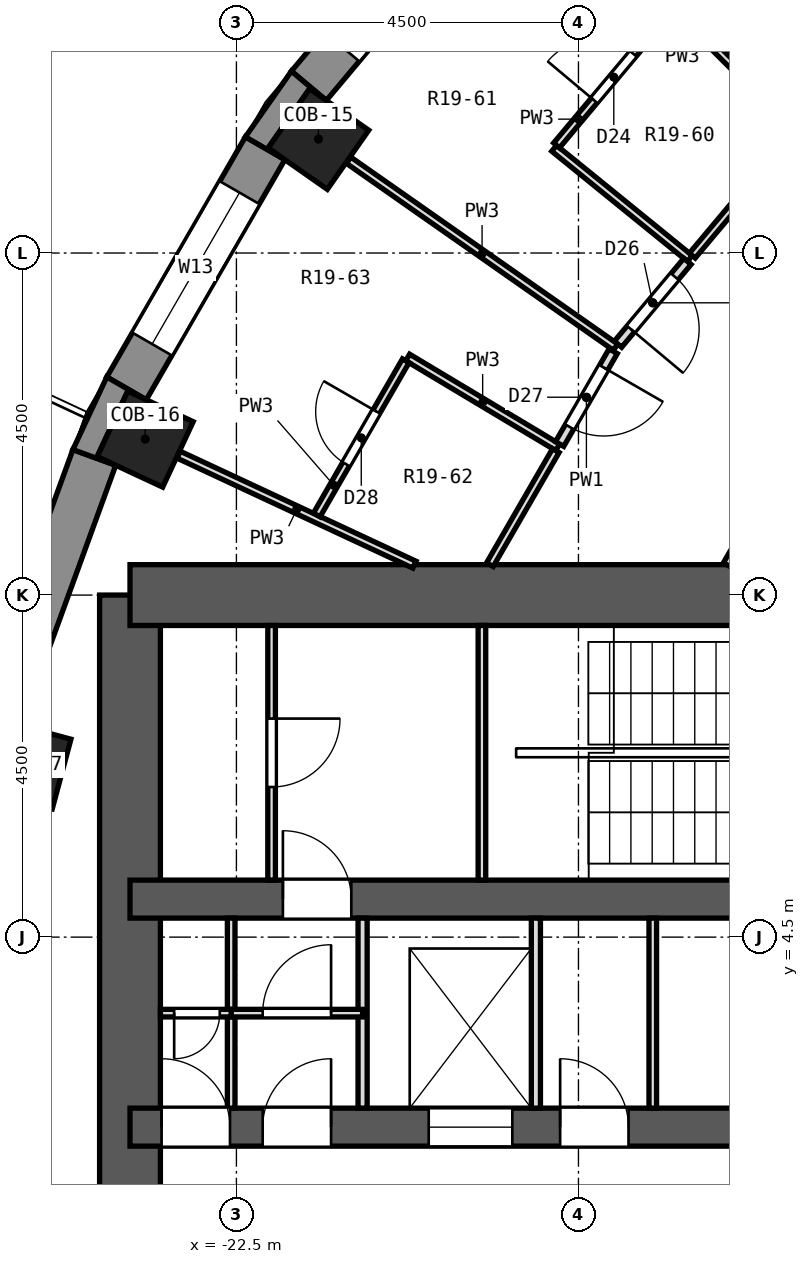
"""IFC4 building model, lengths in metres.
Left out: names, types, materials, properties, quantities, classifications, styles, units other than length and angle.
Written with IfcOpenShell. Run it as: python <this file> out.ifc"""

import sys

from ifc_helpers import new_model, si_unit, direction, frame, frame_2d, origin, origin_2d, place, context, subcontext, project, spatial, polyline, rectangle, outline, extrude, element, fill, save


model = new_model("IFC4")
c1 = context("Model", 3, precision=1e-05, world=origin(), true_north=direction((0.0, 1.0)))
c2 = subcontext(c1, "Body", "Model", "MODEL_VIEW")
j1 = project(units=[si_unit("LENGTHUNIT", "METRE"), si_unit("PLANEANGLEUNIT", "RADIAN")], contexts=[c1])
p1 = place(None, origin())
s1 = spatial("IfcSite", under=j1, at=p1, CompositionType="ELEMENT")
p2 = place(p1, origin())
s2 = spatial("IfcBuilding", under=s1, at=p2, CompositionType="ELEMENT")
p3 = place(p2, frame((0.0, 0.0, 111.7)))
s3 = spatial("IfcBuildingStorey", under=s2, at=p3, CompositionType="ELEMENT", Elevation=111.7)
for number, where, z_axis, x_axis in (
    (1, (-21.421, 14.999, 0.0), (0.0, 0.0, 1.0), (-0.819, 0.574, 0.0)),
    (2, (-23.7, 11.052, 0.0), (0.0, 0.0, 1.0), (-0.906, 0.423, 0.0)),
    (3, (-25.259, 6.768, 0.0), (0.0, 0.0, 1.0), (-0.966, 0.259, 0.0)),
):
    element("IfcColumn", number, at=place(p3, frame(where, z_axis=z_axis, x_axis=x_axis)), inside=s3, PredefinedType="COLUMN", context=c2, shape_type="SweptSolid", body=[
        extrude(rectangle(XDim=0.95, YDim=0.95, at=origin_2d()), origin(), (0.0, 0.0, 1.0), 3.3),
    ])
p4 = place(p3, frame((-23.9, -9.0, 0.0), z_axis=(0.0, 0.0, 1.0), x_axis=(0.0, 1.0, 0.0)))
e4 = element("IfcWall", 4, at=p4, inside=s3, PredefinedType="SHEAR", context=c2, shape_type="SweptSolid", body=[
    extrude(rectangle(XDim=18.0, YDim=0.8, at=frame_2d((9.0, 0.0))), origin(), (0.0, 0.0, 1.0), 3.3),
])
p5 = place(p3, frame((-13.5, 9.0, 0.0), z_axis=(0.0, 0.0, 1.0), x_axis=(-1.0, 0.0, 0.0)))
e5 = element("IfcWall", 5, at=p5, inside=s3, PredefinedType="SHEAR", context=c2, shape_type="SweptSolid", body=[
    extrude(rectangle(XDim=10.4, YDim=0.8, at=frame_2d((5.2, 0.0))), origin(), (0.0, 0.0, 1.0), 3.3),
])
p6 = place(p3, frame((-13.5, 5.0, 0.0), z_axis=(0.0, 0.0, 1.0), x_axis=(-1.0, 0.0, 0.0)))
e6 = element("IfcWall", 6, at=p6, inside=s3, PredefinedType="SHEAR", context=c2, shape_type="SweptSolid", body=[
    extrude(rectangle(XDim=10.4, YDim=0.5, at=frame_2d((5.2, 0.0))), origin(), (0.0, 0.0, 1.0), 3.3),
])
p7 = place(p6, frame((7.489, 0.0, 0.0)))
e7 = element("IfcOpeningElement", 7, at=p7, cuts=e6, PredefinedType="OPENING", context=c2, shape_type="SweptSolid", body=[
    extrude(rectangle(XDim=0.9, YDim=2.1, at=frame_2d((0.45, 1.05))), frame((0.0, 0.262, 0.0), z_axis=(0.0, -1.0, 0.0), x_axis=(1.0, 0.0, 0.0)), (0.0, 0.0, 1.0), 0.524),
])
p8 = place(p3, frame((-13.5, 2.0, 0.0), z_axis=(0.0, 0.0, 1.0), x_axis=(-1.0, 0.0, 0.0)))
e8 = element("IfcWall", 8, at=p8, inside=s3, PredefinedType="SHEAR", context=c2, shape_type="SweptSolid", body=[
    extrude(rectangle(XDim=10.4, YDim=0.5, at=frame_2d((5.2, 0.0))), origin(), (0.0, 0.0, 1.0), 3.3),
])
p9 = place(p8, frame((5.37, 0.0, 0.0)))
e9 = element("IfcOpeningElement", 9, at=p9, cuts=e8, PredefinedType="OPENING", context=c2, shape_type="SweptSolid", body=[
    extrude(rectangle(XDim=1.1, YDim=2.1, at=frame_2d((0.55, 1.05))), frame((0.0, 0.262, 0.0), z_axis=(0.0, -1.0, 0.0), x_axis=(1.0, 0.0, 0.0)), (0.0, 0.0, 1.0), 0.524),
])
p10 = place(p8, frame((1.511, 0.0, 0.0)))
e10 = element("IfcOpeningElement", 10, at=p10, cuts=e8, PredefinedType="OPENING", context=c2, shape_type="SweptSolid", body=[
    extrude(rectangle(XDim=0.9, YDim=2.1, at=frame_2d((0.45, 1.05))), frame((0.0, 0.262, 0.0), z_axis=(0.0, -1.0, 0.0), x_axis=(1.0, 0.0, 0.0)), (0.0, 0.0, 1.0), 0.524),
])
p11 = place(p8, frame((3.841, 0.0, 0.0)))
e11 = element("IfcOpeningElement", 11, at=p11, cuts=e8, PredefinedType="OPENING", context=c2, shape_type="SweptSolid", body=[
    extrude(rectangle(XDim=0.9, YDim=2.1, at=frame_2d((0.45, 1.05))), frame((0.0, 0.262, 0.0), z_axis=(0.0, -1.0, 0.0), x_axis=(1.0, 0.0, 0.0)), (0.0, 0.0, 1.0), 0.524),
])
p12 = place(p8, frame((7.754, 0.0, 0.0)))
e12 = element("IfcOpeningElement", 12, at=p12, cuts=e8, PredefinedType="OPENING", context=c2, shape_type="SweptSolid", body=[
    extrude(rectangle(XDim=0.9, YDim=2.1, at=frame_2d((0.45, 1.05))), frame((0.0, 0.262, 0.0), z_axis=(0.0, -1.0, 0.0), x_axis=(1.0, 0.0, 0.0)), (0.0, 0.0, 1.0), 0.524),
])
p13 = place(p8, frame((9.084, 0.0, 0.0)))
e13 = element("IfcOpeningElement", 13, at=p13, cuts=e8, PredefinedType="OPENING", context=c2, shape_type="SweptSolid", body=[
    extrude(rectangle(XDim=0.9, YDim=2.1, at=frame_2d((0.45, 1.05))), frame((0.0, 0.262, 0.0), z_axis=(0.0, -1.0, 0.0), x_axis=(1.0, 0.0, 0.0)), (0.0, 0.0, 1.0), 0.524),
])
p14 = place(p3, frame((-19.202, 18.494, 0.0), z_axis=(0.0, 0.0, 1.0), x_axis=(-0.642774476932, -0.766055462616, 0.0)))
e14 = element("IfcWall", 14, at=p14, inside=s3, PredefinedType="SOLIDWALL", context=c2, shape_type="SweptSolid", body=[
    extrude(rectangle(XDim=3.648, YDim=0.6, at=frame_2d((1.824, 0.0))), origin(), (0.0, 0.0, 1.0), 2.8),
])
p15 = place(p14, frame((0.674, 0.0, 0.9)))
e15 = element("IfcOpeningElement", 15, at=p15, cuts=e14, PredefinedType="OPENING", context=c2, shape_type="SweptSolid", body=[
    extrude(rectangle(XDim=2.3, YDim=1.8, at=frame_2d((1.15, 0.9))), frame((0.0, 0.312, 0.0), z_axis=(0.0, -1.0, 0.0), x_axis=(1.0, 0.0, 0.0)), (0.0, 0.0, 1.0), 0.624),
])
p16 = place(p3, frame((-22.122, 14.878, 0.0), z_axis=(0.0, 0.0, 1.0), x_axis=(-0.499954196102, -0.866051847062, 0.0)))
e16 = element("IfcWall", 16, at=p16, inside=s3, PredefinedType="SOLIDWALL", context=c2, shape_type="SweptSolid", body=[
    extrude(rectangle(XDim=3.648, YDim=0.6, at=frame_2d((1.824, 0.0))), origin(), (0.0, 0.0, 1.0), 2.8),
])
p17 = place(p16, frame((0.674, 0.0, 0.9)))
e17 = element("IfcOpeningElement", 17, at=p17, cuts=e16, PredefinedType="OPENING", context=c2, shape_type="SweptSolid", body=[
    extrude(rectangle(XDim=2.3, YDim=1.8, at=frame_2d((1.15, 0.9))), frame((0.0, 0.312, 0.0), z_axis=(0.0, -1.0, 0.0), x_axis=(1.0, 0.0, 0.0)), (0.0, 0.0, 1.0), 0.624),
])
p18 = place(p3, frame((-24.369, 10.811, 0.0), z_axis=(0.0, 0.0, 1.0), x_axis=(-0.341990236633, -0.939703505393, 0.0)))
e18 = element("IfcWall", 18, at=p18, inside=s3, PredefinedType="SOLIDWALL", context=c2, shape_type="SweptSolid", body=[
    extrude(rectangle(XDim=3.648, YDim=0.6, at=frame_2d((1.824, 0.0))), origin(), (0.0, 0.0, 1.0), 2.8),
])
p19 = place(p3, origin())
e19 = element("IfcWall", 19, at=p19, inside=s3, PredefinedType="SOLIDWALL", context=c2, shape_type="SweptSolid", body=[
    extrude(outline(polyline([(-22.382, 15.028), (-21.862, 14.728), (-22.083, 14.882), (-21.538, 15.661), (-21.317, 15.506), (-21.777, 15.892), (-22.382, 15.028)])), origin(), (0.0, 0.0, 1.0), 2.8),
])
p20 = place(p3, origin())
e20 = element("IfcWall", 20, at=p20, inside=s3, PredefinedType="SOLIDWALL", context=c2, shape_type="SweptSolid", body=[
    extrude(outline(polyline([(-24.651, 10.913), (-24.087, 10.708), (-24.331, 10.822), (-23.93, 11.683), (-23.686, 11.569), (-24.206, 11.869), (-24.651, 10.913)])), origin(), (0.0, 0.0, 1.0), 2.8),
])
p21 = place(p3, frame((-18.148, 18.148, 0.0), z_axis=(0.0, 0.0, 1.0), x_axis=(0.707106781187, -0.707106781187, 0.0)))
e21 = element("IfcWall", 21, at=p21, inside=s3, PredefinedType="PARTITIONING", context=c2, shape_type="SweptSolid", body=[
    extrude(rectangle(XDim=4.286, YDim=0.1, at=frame_2d((2.143, 0.0))), origin(), (0.0, 0.0, 1.0), 2.8),
])
p22 = place(p3, frame((-18.32, 14.878, 0.0), z_axis=(0.0, 0.0, 1.0), x_axis=(0.776386597989, -0.630256971768, 0.0)))
e22 = element("IfcWall", 22, at=p22, inside=s3, PredefinedType="PARTITIONING", context=c2, shape_type="SweptSolid", body=[
    extrude(rectangle(XDim=2.301, YDim=0.1, at=frame_2d((1.15, 0.0))), origin(), (0.0, 0.0, 1.0), 2.8),
])
p23 = place(p3, frame((-21.024, 14.721, 0.0), z_axis=(0.0, 0.0, 1.0), x_axis=(0.819173054824, -0.573546429028, 0.0)))
e23 = element("IfcWall", 23, at=p23, inside=s3, PredefinedType="PARTITIONING", context=c2, shape_type="SweptSolid", body=[
    extrude(rectangle(XDim=4.287, YDim=0.1, at=frame_2d((2.144, 0.0))), origin(), (0.0, 0.0, 1.0), 2.8),
])
p24 = place(p3, frame((-20.247, 12.126, 0.0), z_axis=(0.0, 0.0, 1.0), x_axis=(0.857988737522, -0.513668498435, 0.0)))
e24 = element("IfcWall", 24, at=p24, inside=s3, PredefinedType="PARTITIONING", context=c2, shape_type="SweptSolid", body=[
    extrude(rectangle(XDim=2.301, YDim=0.1, at=frame_2d((1.15, 0.0))), origin(), (0.0, 0.0, 1.0), 2.8),
])
p25 = place(p3, frame((-23.26, 10.847, 0.0), z_axis=(0.0, 0.0, 1.0), x_axis=(0.906263293643, -0.422713665021, 0.0)))
e25 = element("IfcWall", 25, at=p25, inside=s3, PredefinedType="PARTITIONING", context=c2, shape_type="SweptSolid", body=[
    extrude(rectangle(XDim=3.423, YDim=0.1, at=frame_2d((1.711, 0.0))), origin(), (0.0, 0.0, 1.0), 2.8),
])
p26 = place(p3, frame((-16.502, 13.466, 0.0), z_axis=(0.0, 0.0, 1.0), x_axis=(0.642783688793, 0.766047733122, 0.0)))
e26 = element("IfcWall", 26, at=p26, inside=s3, PredefinedType="PARTITIONING", context=c2, shape_type="SweptSolid", body=[
    extrude(rectangle(XDim=2.104, YDim=0.1, at=frame_2d((1.052, 0.0))), origin(), (0.0, 0.0, 1.0), 2.8),
])
p27 = place(p3, frame((-17.48, 12.3, 0.0), z_axis=(0.0, 0.0, 1.0), x_axis=(0.642680541645, 0.766134271124, 0.0)))
e27 = element("IfcWall", 27, at=p27, inside=s3, PredefinedType="PARTITIONING", context=c2, shape_type="SweptSolid", body=[
    extrude(rectangle(XDim=1.422, YDim=0.125, at=frame_2d((0.711, 0.0))), origin(), (0.0, 0.0, 1.0), 2.8),
])
p28 = place(p27, frame((0.261, 0.0, 0.0)))
e28 = element("IfcOpeningElement", 28, at=p28, cuts=e27, PredefinedType="OPENING", context=c2, shape_type="SweptSolid", body=[
    extrude(rectangle(XDim=0.9, YDim=2.1, at=frame_2d((0.45, 1.05))), frame((0.0, 0.074, 0.0), z_axis=(0.0, -1.0, 0.0), x_axis=(1.0, 0.0, 0.0)), (0.0, 0.0, 1.0), 0.149),
])
p29 = place(p3, frame((-18.288, 14.916, 0.0), z_axis=(0.0, 0.0, 1.0), x_axis=(0.642558986359, 0.766236222747, 0.0)))
e29 = element("IfcWall", 29, at=p29, inside=s3, PredefinedType="PARTITIONING", context=c2, shape_type="SweptSolid", body=[
    extrude(rectangle(XDim=2.343, YDim=0.1, at=frame_2d((1.172, 0.0))), origin(), (0.0, 0.0, 1.0), 2.8),
])
p30 = place(p29, frame((0.771, 0.0, 0.0)))
e30 = element("IfcOpeningElement", 30, at=p30, cuts=e29, PredefinedType="OPENING", context=c2, shape_type="SweptSolid", body=[
    extrude(rectangle(XDim=0.8, YDim=2.1, at=frame_2d((0.4, 1.05))), frame((0.0, 0.062, 0.0), z_axis=(0.0, -1.0, 0.0), x_axis=(1.0, 0.0, 0.0)), (0.0, 0.0, 1.0), 0.124),
])
p31 = place(p3, frame((-16.049, 9.4, 0.0), z_axis=(0.0, 0.0, 1.0), x_axis=(0.499553700297, 0.866282921752, 0.0)))
e31 = element("IfcWall", 31, at=p31, inside=s3, PredefinedType="PARTITIONING", context=c2, shape_type="SweptSolid", body=[
    extrude(rectangle(XDim=1.461, YDim=0.1, at=frame_2d((0.73, 0.0))), origin(), (0.0, 0.0, 1.0), 2.8),
])
p32 = place(p3, frame((-19.165, 9.4, 0.0), z_axis=(0.0, 0.0, 1.0), x_axis=(0.500214230422, 0.865901682458, 0.0)))
e32 = element("IfcWall", 32, at=p32, inside=s3, PredefinedType="PARTITIONING", context=c2, shape_type="SweptSolid", body=[
    extrude(rectangle(XDim=1.733, YDim=0.1, at=frame_2d((0.867, 0.0))), origin(), (0.0, 0.0, 1.0), 2.8),
])
p33 = place(p3, frame((-18.248, 10.987, 0.0), z_axis=(0.0, 0.0, 1.0), x_axis=(0.500107311056, 0.865963438852, 0.0)))
e33 = element("IfcWall", 33, at=p33, inside=s3, PredefinedType="PARTITIONING", context=c2, shape_type="SweptSolid", body=[
    extrude(rectangle(XDim=1.409, YDim=0.125, at=frame_2d((0.705, 0.0))), origin(), (0.0, 0.0, 1.0), 2.8),
])
p34 = place(p33, frame((0.261, 0.0, 0.0)))
e34 = element("IfcOpeningElement", 34, at=p34, cuts=e33, PredefinedType="OPENING", context=c2, shape_type="SweptSolid", body=[
    extrude(rectangle(XDim=0.9, YDim=2.1, at=frame_2d((0.45, 1.05))), frame((0.0, 0.074, 0.0), z_axis=(0.0, -1.0, 0.0), x_axis=(1.0, 0.0, 0.0)), (0.0, 0.0, 1.0), 0.149),
])
p35 = place(p3, frame((-21.443, 10.054, 0.0), z_axis=(0.0, 0.0, 1.0), x_axis=(0.499984100898, 0.86603458294, 0.0)))
e35 = element("IfcWall", 35, at=p35, inside=s3, PredefinedType="PARTITIONING", context=c2, shape_type="SweptSolid", body=[
    extrude(rectangle(XDim=2.342, YDim=0.1, at=frame_2d((1.171, 0.0))), origin(), (0.0, 0.0, 1.0), 2.8),
])
p36 = place(p35, frame((0.771, 0.0, 0.0)))
e36 = element("IfcOpeningElement", 36, at=p36, cuts=e35, PredefinedType="OPENING", context=c2, shape_type="SweptSolid", body=[
    extrude(rectangle(XDim=0.8, YDim=2.1, at=frame_2d((0.4, 1.05))), frame((0.0, 0.062, 0.0), z_axis=(0.0, -1.0, 0.0), x_axis=(1.0, 0.0, 0.0)), (0.0, 0.0, 1.0), 0.124),
])
p37 = place(p3, frame((-17.022, 2.25, 0.0), z_axis=(0.0, 0.0, 1.0), x_axis=(0.0, 1.0, 0.0)))
e37 = element("IfcWall", 37, at=p37, inside=s3, PredefinedType="PARTITIONING", context=c2, shape_type="SweptSolid", body=[
    extrude(rectangle(XDim=2.5, YDim=0.1, at=frame_2d((1.25, 0.0))), origin(), (0.0, 0.0, 1.0), 2.8),
])
for number, where, z_axis, x_axis in (
    (38, (-18.56, 2.25, 0.0), (0.0, 0.0, 1.0), (0.0, 1.0, 0.0)),
    (39, (-20.84, 2.25, 0.0), (0.0, 0.0, 1.0), (0.0, 1.0, 0.0)),
):
    element("IfcWall", number, at=place(p3, frame(where, z_axis=z_axis, x_axis=x_axis)), inside=s3, PredefinedType="PARTITIONING", context=c2, shape_type="SweptSolid", body=[
        extrude(rectangle(XDim=2.5, YDim=0.12, at=frame_2d((1.25, 0.0))), origin(), (0.0, 0.0, 1.0), 2.8),
    ])
p38 = place(p3, frame((-22.569, 2.25, 0.0), z_axis=(0.0, 0.0, 1.0), x_axis=(0.0, 1.0, 0.0)))
e40 = element("IfcWall", 40, at=p38, inside=s3, PredefinedType="PARTITIONING", context=c2, shape_type="SweptSolid", body=[
    extrude(rectangle(XDim=2.5, YDim=0.1, at=frame_2d((1.25, 0.0))), origin(), (0.0, 0.0, 1.0), 2.8),
])
p39 = place(p3, frame((-20.84, 3.5, 0.0), z_axis=(0.0, 0.0, 1.0), x_axis=(-1.0, 0.0, 0.0)))
e41 = element("IfcWall", 41, at=p39, inside=s3, PredefinedType="PARTITIONING", context=c2, shape_type="SweptSolid", body=[
    extrude(rectangle(XDim=1.729, YDim=0.1, at=frame_2d((0.865, 0.0))), origin(), (0.0, 0.0, 1.0), 2.8),
])
p40 = place(p39, frame((0.415, 0.0, 0.0)))
e42 = element("IfcOpeningElement", 42, at=p40, cuts=e41, PredefinedType="OPENING", context=c2, shape_type="SweptSolid", body=[
    extrude(rectangle(XDim=0.9, YDim=2.1, at=frame_2d((0.45, 1.05))), frame((0.0, 0.062, 0.0), z_axis=(0.0, -1.0, 0.0), x_axis=(1.0, 0.0, 0.0)), (0.0, 0.0, 1.0), 0.124),
])
p41 = place(p3, frame((-22.569, 3.5, 0.0), z_axis=(0.0, 0.0, 1.0), x_axis=(-1.0, 0.0, 0.0)))
e43 = element("IfcWall", 43, at=p41, inside=s3, PredefinedType="PARTITIONING", context=c2, shape_type="SweptSolid", body=[
    extrude(rectangle(XDim=0.931, YDim=0.1, at=frame_2d((0.465, 0.0))), origin(), (0.0, 0.0, 1.0), 2.8),
])
p42 = place(p41, frame((0.15, 0.0, 0.0)))
e44 = element("IfcOpeningElement", 44, at=p42, cuts=e43, PredefinedType="OPENING", context=c2, shape_type="SweptSolid", body=[
    extrude(rectangle(XDim=0.6, YDim=2.1, at=frame_2d((0.3, 1.05))), frame((0.0, 0.062, 0.0), z_axis=(0.0, -1.0, 0.0), x_axis=(1.0, 0.0, 0.0)), (0.0, 0.0, 1.0), 0.124),
])
p43 = place(p3, frame((-19.27, 5.25, 0.0), z_axis=(0.0, 0.0, 1.0), x_axis=(0.0, 1.0, 0.0)))
e45 = element("IfcWall", 45, at=p43, inside=s3, PredefinedType="PARTITIONING", context=c2, shape_type="SweptSolid", body=[
    extrude(rectangle(XDim=3.35, YDim=0.1, at=frame_2d((1.675, 0.0))), origin(), (0.0, 0.0, 1.0), 2.8),
])
p44 = place(p3, frame((-22.037, 5.25, 0.0), z_axis=(0.0, 0.0, 1.0), x_axis=(0.0, 1.0, 0.0)))
e46 = element("IfcWall", 46, at=p44, inside=s3, PredefinedType="PARTITIONING", context=c2, shape_type="SweptSolid", body=[
    extrude(rectangle(XDim=3.35, YDim=0.1, at=frame_2d((1.675, 0.0))), origin(), (0.0, 0.0, 1.0), 2.8),
])
p45 = place(p44, frame((1.225, 0.0, 0.0)))
e47 = element("IfcOpeningElement", 47, at=p45, cuts=e46, PredefinedType="OPENING", context=c2, shape_type="SweptSolid", body=[
    extrude(rectangle(XDim=0.9, YDim=2.1, at=frame_2d((0.45, 1.05))), frame((0.0, 0.062, 0.0), z_axis=(0.0, -1.0, 0.0), x_axis=(1.0, 0.0, 0.0)), (0.0, 0.0, 1.0), 0.124),
])
p46 = place(p15, origin())
e48 = element("IfcWindow", 48, at=p46, inside=s3, PartitioningType="SINGLE_PANEL", PredefinedType="WINDOW", context=c2, shape_type="SweptSolid", body=[
    extrude(rectangle(XDim=2.3, YDim=1.8, at=frame_2d((1.15, 0.9))), frame((0.0, 0.18, 0.0), z_axis=(0.0, -1.0, 0.0), x_axis=(1.0, 0.0, 0.0)), (0.0, 0.0, 1.0), 0.06),
])
fill(e15, e48)
p47 = place(p17, origin())
e49 = element("IfcWindow", 49, at=p47, inside=s3, PartitioningType="SINGLE_PANEL", PredefinedType="WINDOW", context=c2, shape_type="SweptSolid", body=[
    extrude(rectangle(XDim=2.3, YDim=1.8, at=frame_2d((1.15, 0.9))), frame((0.0, 0.18, 0.0), z_axis=(0.0, -1.0, 0.0), x_axis=(1.0, 0.0, 0.0)), (0.0, 0.0, 1.0), 0.06),
])
fill(e17, e49)
p48 = place(p30, origin())
e50 = element("IfcDoor", 50, at=p48, inside=s3, OperationType="SINGLE_SWING_LEFT", PredefinedType="DOOR", context=c2, shape_type="SweptSolid", body=[
    extrude(rectangle(XDim=0.8, YDim=2.1, at=frame_2d((0.4, 1.05))), frame((0.0, 0.025, 0.0), z_axis=(0.0, -1.0, 0.0), x_axis=(1.0, 0.0, 0.0)), (0.0, 0.0, 1.0), 0.05),
])
fill(e30, e50)
p49 = place(p28, frame((0.9, 0.0, 0.0), z_axis=(0.0, 0.0, 1.0), x_axis=(-1.0, 0.0, 0.0)))
e51 = element("IfcDoor", 51, at=p49, inside=s3, OperationType="SINGLE_SWING_RIGHT", PredefinedType="DOOR", context=c2, shape_type="SweptSolid", body=[
    extrude(rectangle(XDim=0.9, YDim=2.1, at=frame_2d((0.45, 1.05))), frame((0.0, 0.025, 0.0), z_axis=(0.0, -1.0, 0.0), x_axis=(1.0, 0.0, 0.0)), (0.0, 0.0, 1.0), 0.05),
])
fill(e28, e51)
p50 = place(p34, frame((0.9, 0.0, 0.0), z_axis=(0.0, 0.0, 1.0), x_axis=(-1.0, 0.0, 0.0)))
e52 = element("IfcDoor", 52, at=p50, inside=s3, OperationType="SINGLE_SWING_LEFT", PredefinedType="DOOR", context=c2, shape_type="SweptSolid", body=[
    extrude(rectangle(XDim=0.9, YDim=2.1, at=frame_2d((0.45, 1.05))), frame((0.0, 0.025, 0.0), z_axis=(0.0, -1.0, 0.0), x_axis=(1.0, 0.0, 0.0)), (0.0, 0.0, 1.0), 0.05),
])
fill(e34, e52)
p51 = place(p36, origin())
e53 = element("IfcDoor", 53, at=p51, inside=s3, OperationType="SINGLE_SWING_RIGHT", PredefinedType="DOOR", context=c2, shape_type="SweptSolid", body=[
    extrude(rectangle(XDim=0.8, YDim=2.1, at=frame_2d((0.4, 1.05))), frame((0.0, 0.025, 0.0), z_axis=(0.0, -1.0, 0.0), x_axis=(1.0, 0.0, 0.0)), (0.0, 0.0, 1.0), 0.05),
])
fill(e36, e53)
p52 = place(p9, origin())
e54 = element("IfcDoor", 54, at=p52, inside=s3, OperationType="DOUBLE_DOOR_SLIDING", PredefinedType="DOOR", context=c2, shape_type="SweptSolid", body=[
    extrude(rectangle(XDim=1.1, YDim=2.1, at=frame_2d((0.55, 1.05))), frame((0.0, 0.025, 0.0), z_axis=(0.0, -1.0, 0.0), x_axis=(1.0, 0.0, 0.0)), (0.0, 0.0, 1.0), 0.05),
])
fill(e9, e54)
p53 = place(p11, frame((0.9, 0.0, 0.0), z_axis=(0.0, 0.0, 1.0), x_axis=(-1.0, 0.0, 0.0)))
e55 = element("IfcDoor", 55, at=p53, inside=s3, OperationType="SINGLE_SWING_LEFT", PredefinedType="DOOR", context=c2, shape_type="SweptSolid", body=[
    extrude(rectangle(XDim=0.9, YDim=2.1, at=frame_2d((0.45, 1.05))), frame((0.0, 0.025, 0.0), z_axis=(0.0, -1.0, 0.0), x_axis=(1.0, 0.0, 0.0)), (0.0, 0.0, 1.0), 0.05),
])
fill(e11, e55)
p54 = place(p12, frame((0.9, 0.0, 0.0), z_axis=(0.0, 0.0, 1.0), x_axis=(-1.0, 0.0, 0.0)))
e56 = element("IfcDoor", 56, at=p54, inside=s3, OperationType="SINGLE_SWING_RIGHT", PredefinedType="DOOR", context=c2, shape_type="SweptSolid", body=[
    extrude(rectangle(XDim=0.9, YDim=2.1, at=frame_2d((0.45, 1.05))), frame((0.0, 0.025, 0.0), z_axis=(0.0, -1.0, 0.0), x_axis=(1.0, 0.0, 0.0)), (0.0, 0.0, 1.0), 0.05),
])
fill(e12, e56)
p55 = place(p13, frame((0.9, 0.0, 0.0), z_axis=(0.0, 0.0, 1.0), x_axis=(-1.0, 0.0, 0.0)))
e57 = element("IfcDoor", 57, at=p55, inside=s3, OperationType="SINGLE_SWING_LEFT", PredefinedType="DOOR", context=c2, shape_type="SweptSolid", body=[
    extrude(rectangle(XDim=0.9, YDim=2.1, at=frame_2d((0.45, 1.05))), frame((0.0, 0.025, 0.0), z_axis=(0.0, -1.0, 0.0), x_axis=(1.0, 0.0, 0.0)), (0.0, 0.0, 1.0), 0.05),
])
fill(e13, e57)
p56 = place(p42, origin())
e58 = element("IfcDoor", 58, at=p56, inside=s3, OperationType="SINGLE_SWING_RIGHT", PredefinedType="DOOR", context=c2, shape_type="SweptSolid", body=[
    extrude(rectangle(XDim=0.6, YDim=2.1, at=frame_2d((0.3, 1.05))), frame((0.0, 0.025, 0.0), z_axis=(0.0, -1.0, 0.0), x_axis=(1.0, 0.0, 0.0)), (0.0, 0.0, 1.0), 0.05),
])
fill(e44, e58)
p57 = place(p40, frame((0.9, 0.0, 0.0), z_axis=(0.0, 0.0, 1.0), x_axis=(-1.0, 0.0, 0.0)))
e59 = element("IfcDoor", 59, at=p57, inside=s3, OperationType="SINGLE_SWING_RIGHT", PredefinedType="DOOR", context=c2, shape_type="SweptSolid", body=[
    extrude(rectangle(XDim=0.9, YDim=2.1, at=frame_2d((0.45, 1.05))), frame((0.0, 0.025, 0.0), z_axis=(0.0, -1.0, 0.0), x_axis=(1.0, 0.0, 0.0)), (0.0, 0.0, 1.0), 0.05),
])
fill(e42, e59)
p58 = place(p45, frame((0.9, 0.0, 0.0), z_axis=(0.0, 0.0, 1.0), x_axis=(-1.0, 0.0, 0.0)))
e60 = element("IfcDoor", 60, at=p58, inside=s3, OperationType="SINGLE_SWING_LEFT", PredefinedType="DOOR", context=c2, shape_type="SweptSolid", body=[
    extrude(rectangle(XDim=0.9, YDim=2.1, at=frame_2d((0.45, 1.05))), frame((0.0, 0.025, 0.0), z_axis=(0.0, -1.0, 0.0), x_axis=(1.0, 0.0, 0.0)), (0.0, 0.0, 1.0), 0.05),
])
fill(e47, e60)
p59 = place(p7, frame((0.9, 0.0, 0.0), z_axis=(0.0, 0.0, 1.0), x_axis=(-1.0, 0.0, 0.0)))
e61 = element("IfcDoor", 61, at=p59, inside=s3, OperationType="SINGLE_SWING_LEFT", PredefinedType="DOOR", context=c2, shape_type="SweptSolid", body=[
    extrude(rectangle(XDim=0.9, YDim=2.1, at=frame_2d((0.45, 1.05))), frame((0.0, 0.025, 0.0), z_axis=(0.0, -1.0, 0.0), x_axis=(1.0, 0.0, 0.0)), (0.0, 0.0, 1.0), 0.05),
])
fill(e7, e61)
save(model, sys.argv[1])
